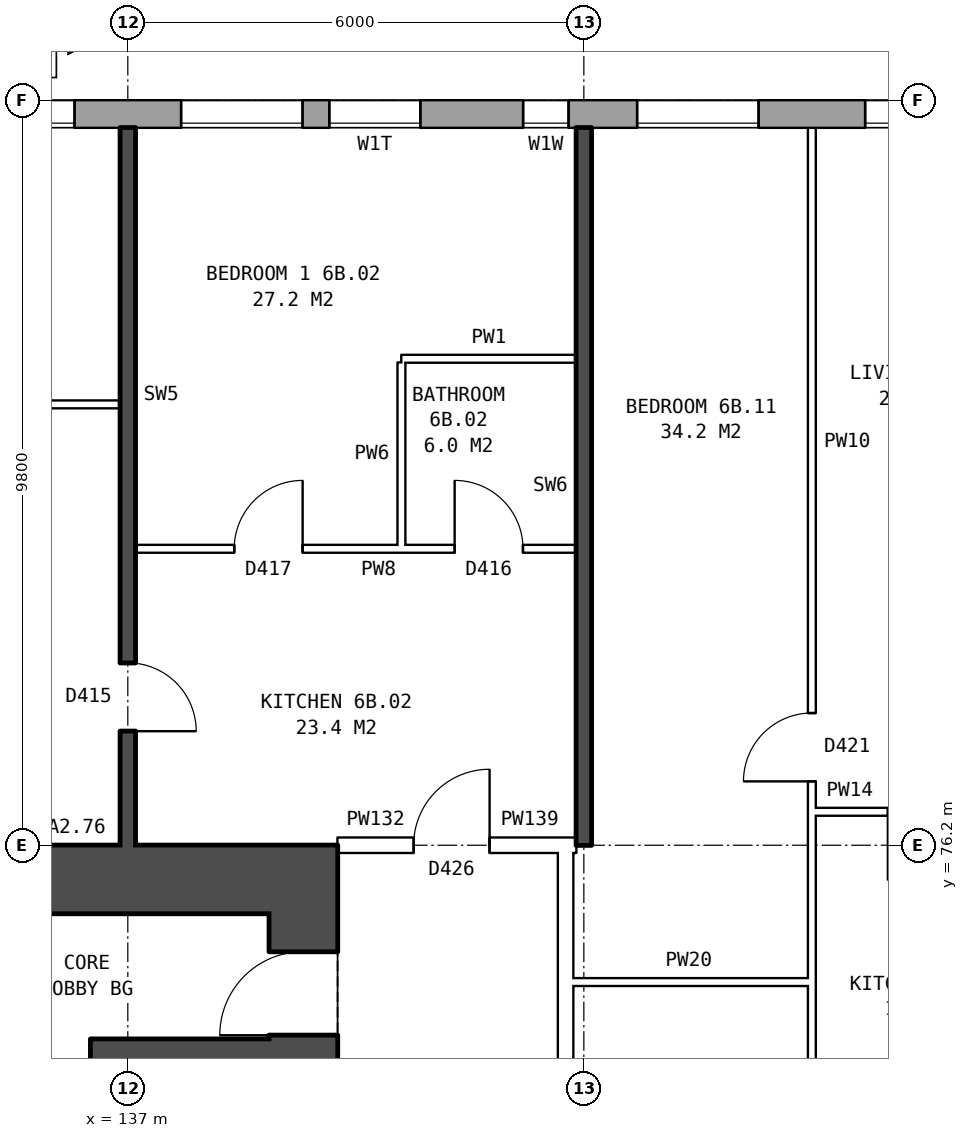
"""IFC4 building model, lengths in metres.
Left out: names, types, materials, properties, quantities, classifications, styles, units other than length and angle.
Written with IfcOpenShell. Run it as: python <this file> out.ifc"""

import sys

from ifc_helpers import new_model, si_unit, direction, frame, frame_2d, origin, place, context, subcontext, project, spatial, rectangle, extrude, element, fill, save


model = new_model("IFC4")
c1 = context("Model", 3, precision=1e-05, world=origin(), true_north=direction((0.0, 1.0)))
c2 = subcontext(c1, "Body", "Model", "MODEL_VIEW")
j1 = project(units=[si_unit("LENGTHUNIT", "METRE"), si_unit("PLANEANGLEUNIT", "RADIAN")], contexts=[c1])
p1 = place(None, origin())
s1 = spatial("IfcSite", under=j1, at=p1, CompositionType="ELEMENT")
p2 = place(p1, origin())
s2 = spatial("IfcBuilding", under=s1, at=p2, CompositionType="ELEMENT")
p3 = place(p2, frame((0.0, 0.0, 25.7)))
s3 = spatial("IfcBuildingStorey", under=s2, at=p3, CompositionType="ELEMENT", Elevation=25.7)
p4 = place(p3, frame((174.675, 85.82, 0.0), z_axis=(0.0, 0.0, 1.0), x_axis=(-1.0, 0.0, 0.0)))
e1 = element("IfcWall", 1, at=p4, inside=s3, PredefinedType="STANDARD", context=c2, shape_type="SweptSolid", body=[
    extrude(rectangle(XDim=40.601, YDim=0.36, at=frame_2d((20.3, 0.0))), origin(), (0.0, 0.0, 1.0), 2.85),
])
p5 = place(p4, frame((2.375, 0.0, 0.8)))
e2 = element("IfcOpeningElement", 2, at=p5, cuts=e1, PredefinedType="OPENING", context=c2, shape_type="SweptSolid", body=[
    extrude(rectangle(XDim=1.6, YDim=1.8, at=frame_2d((0.8, 0.9))), frame((0.0, 0.19, 0.0), z_axis=(0.0, -1.0, 0.0), x_axis=(1.0, 0.0, 0.0)), (0.0, 0.0, 1.0), 0.38),
])
p6 = place(p4, frame((4.275, 0.0, 0.8)))
e3 = element("IfcOpeningElement", 3, at=p6, cuts=e1, PredefinedType="OPENING", context=c2, shape_type="SweptSolid", body=[
    extrude(rectangle(XDim=1.2, YDim=1.8, at=frame_2d((0.6, 0.9))), frame((0.0, 0.19, 0.0), z_axis=(0.0, -1.0, 0.0), x_axis=(1.0, 0.0, 0.0)), (0.0, 0.0, 1.0), 0.38),
])
p7 = place(p4, frame((8.025, 0.0, 0.8)))
e4 = element("IfcOpeningElement", 4, at=p7, cuts=e1, PredefinedType="OPENING", context=c2, shape_type="SweptSolid", body=[
    extrude(rectangle(XDim=0.8, YDim=0.9, at=frame_2d((0.4, 0.45))), frame((0.0, 0.19, 0.0), z_axis=(0.0, -1.0, 0.0), x_axis=(1.0, 0.0, 0.0)), (0.0, 0.0, 1.0), 0.38),
])
p8 = place(p4, frame((11.375, 0.0, 0.8)))
e5 = element("IfcOpeningElement", 5, at=p8, cuts=e1, PredefinedType="OPENING", context=c2, shape_type="SweptSolid", body=[
    extrude(rectangle(XDim=1.6, YDim=1.8, at=frame_2d((0.8, 0.9))), frame((0.0, 0.19, 0.0), z_axis=(0.0, -1.0, 0.0), x_axis=(1.0, 0.0, 0.0)), (0.0, 0.0, 1.0), 0.38),
])
p9 = place(p4, frame((14.375, 0.0, 0.8)))
e6 = element("IfcOpeningElement", 6, at=p9, cuts=e1, PredefinedType="OPENING", context=c2, shape_type="SweptSolid", body=[
    extrude(rectangle(XDim=1.6, YDim=1.8, at=frame_2d((0.8, 0.9))), frame((0.0, 0.19, 0.0), z_axis=(0.0, -1.0, 0.0), x_axis=(1.0, 0.0, 0.0)), (0.0, 0.0, 1.0), 0.38),
])
p10 = place(p4, frame((17.375, 0.0, 0.8)))
e7 = element("IfcOpeningElement", 7, at=p10, cuts=e1, PredefinedType="OPENING", context=c2, shape_type="SweptSolid", body=[
    extrude(rectangle(XDim=1.6, YDim=1.8, at=frame_2d((0.8, 0.9))), frame((0.0, 0.19, 0.0), z_axis=(0.0, -1.0, 0.0), x_axis=(1.0, 0.0, 0.0)), (0.0, 0.0, 1.0), 0.38),
])
p11 = place(p4, frame((20.375, 0.0, 0.8)))
e8 = element("IfcOpeningElement", 8, at=p11, cuts=e1, PredefinedType="OPENING", context=c2, shape_type="SweptSolid", body=[
    extrude(rectangle(XDim=1.6, YDim=1.8, at=frame_2d((0.8, 0.9))), frame((0.0, 0.19, 0.0), z_axis=(0.0, -1.0, 0.0), x_axis=(1.0, 0.0, 0.0)), (0.0, 0.0, 1.0), 0.38),
])
p12 = place(p4, frame((23.375, 0.0, 0.8)))
e9 = element("IfcOpeningElement", 9, at=p12, cuts=e1, PredefinedType="OPENING", context=c2, shape_type="SweptSolid", body=[
    extrude(rectangle(XDim=1.6, YDim=1.8, at=frame_2d((0.8, 0.9))), frame((0.0, 0.19, 0.0), z_axis=(0.0, -1.0, 0.0), x_axis=(1.0, 0.0, 0.0)), (0.0, 0.0, 1.0), 0.38),
])
p13 = place(p4, frame((26.375, 0.0, 0.8)))
e10 = element("IfcOpeningElement", 10, at=p13, cuts=e1, PredefinedType="OPENING", context=c2, shape_type="SweptSolid", body=[
    extrude(rectangle(XDim=1.6, YDim=1.8, at=frame_2d((0.8, 0.9))), frame((0.0, 0.19, 0.0), z_axis=(0.0, -1.0, 0.0), x_axis=(1.0, 0.0, 0.0)), (0.0, 0.0, 1.0), 0.38),
])
p14 = place(p4, frame((29.375, 0.0, 0.8)))
e11 = element("IfcOpeningElement", 11, at=p14, cuts=e1, PredefinedType="OPENING", context=c2, shape_type="SweptSolid", body=[
    extrude(rectangle(XDim=1.6, YDim=1.8, at=frame_2d((0.8, 0.9))), frame((0.0, 0.19, 0.0), z_axis=(0.0, -1.0, 0.0), x_axis=(1.0, 0.0, 0.0)), (0.0, 0.0, 1.0), 0.38),
])
p15 = place(p4, frame((31.875, 0.0, 0.8)))
e12 = element("IfcOpeningElement", 12, at=p15, cuts=e1, PredefinedType="OPENING", context=c2, shape_type="SweptSolid", body=[
    extrude(rectangle(XDim=0.6, YDim=0.9, at=frame_2d((0.3, 0.45))), frame((0.0, 0.19, 0.0), z_axis=(0.0, -1.0, 0.0), x_axis=(1.0, 0.0, 0.0)), (0.0, 0.0, 1.0), 0.38),
])
p16 = place(p4, frame((35.375, 0.0, 0.8)))
e13 = element("IfcOpeningElement", 13, at=p16, cuts=e1, PredefinedType="OPENING", context=c2, shape_type="SweptSolid", body=[
    extrude(rectangle(XDim=1.6, YDim=1.8, at=frame_2d((0.8, 0.9))), frame((0.0, 0.19, 0.0), z_axis=(0.0, -1.0, 0.0), x_axis=(1.0, 0.0, 0.0)), (0.0, 0.0, 1.0), 0.38),
])
p17 = place(p4, frame((38.375, 0.0, 0.8)))
e14 = element("IfcOpeningElement", 14, at=p17, cuts=e1, PredefinedType="OPENING", context=c2, shape_type="SweptSolid", body=[
    extrude(rectangle(XDim=1.6, YDim=1.8, at=frame_2d((0.8, 0.9))), frame((0.0, 0.19, 0.0), z_axis=(0.0, -1.0, 0.0), x_axis=(1.0, 0.0, 0.0)), (0.0, 0.0, 1.0), 0.38),
])
p18 = place(p4, frame((5.775, 0.0, 1.7)))
e15 = element("IfcOpeningElement", 15, at=p18, cuts=e1, PredefinedType="OPENING", context=c2, shape_type="SweptSolid", body=[
    extrude(rectangle(XDim=1.0, YDim=0.9, at=frame_2d((0.5, 0.45))), frame((0.0, 0.19, 0.0), z_axis=(0.0, -1.0, 0.0), x_axis=(1.0, 0.0, 0.0)), (0.0, 0.0, 1.0), 0.38),
])
p19 = place(p4, frame((9.125, 0.0, 0.8)))
e16 = element("IfcOpeningElement", 16, at=p19, cuts=e1, PredefinedType="OPENING", context=c2, shape_type="SweptSolid", body=[
    extrude(rectangle(XDim=1.2, YDim=1.8, at=frame_2d((0.6, 0.9))), frame((0.0, 0.19, 0.0), z_axis=(0.0, -1.0, 0.0), x_axis=(1.0, 0.0, 0.0)), (0.0, 0.0, 1.0), 0.38),
])
p20 = place(p4, frame((33.825, 0.0, 1.7)))
e17 = element("IfcOpeningElement", 17, at=p20, cuts=e1, PredefinedType="OPENING", context=c2, shape_type="SweptSolid", body=[
    extrude(rectangle(XDim=1.2, YDim=0.9, at=frame_2d((0.6, 0.45))), frame((0.0, 0.19, 0.0), z_axis=(0.0, -1.0, 0.0), x_axis=(1.0, 0.0, 0.0)), (0.0, 0.0, 1.0), 0.38),
])
p21 = place(p3, frame((139.31, 64.7, 0.0), z_axis=(0.0, 0.0, 1.0), x_axis=(0.0, 1.0, 0.0)))
e18 = element("IfcWall", 18, at=p21, inside=s3, PredefinedType="SHEAR", context=c2, shape_type="SweptSolid", body=[
    extrude(rectangle(XDim=10.6, YDim=0.9, at=frame_2d((5.3, 0.0))), origin(), (0.0, 0.0, 1.0), 2.85),
])
p22 = place(p21, frame((0.425, 0.0, 0.0)))
e19 = element("IfcOpeningElement", 19, at=p22, cuts=e18, PredefinedType="OPENING", context=c2, shape_type="SweptSolid", body=[
    extrude(rectangle(XDim=1.1, YDim=2.1, at=frame_2d((0.55, 1.05))), frame((0.0, 0.46, 0.0), z_axis=(0.0, -1.0, 0.0), x_axis=(1.0, 0.0, 0.0)), (0.0, 0.0, 1.0), 0.92),
])
p23 = place(p21, frame((9.0, 0.0, 0.0)))
e20 = element("IfcOpeningElement", 20, at=p23, cuts=e18, PredefinedType="OPENING", context=c2, shape_type="SweptSolid", body=[
    extrude(rectangle(XDim=1.1, YDim=2.1, at=frame_2d((0.55, 1.05))), frame((0.0, 0.46, 0.0), z_axis=(0.0, -1.0, 0.0), x_axis=(1.0, 0.0, 0.0)), (0.0, 0.0, 1.0), 0.92),
])
p24 = place(p21, frame((7.225, 0.0, 0.0)))
e21 = element("IfcOpeningElement", 21, at=p24, cuts=e18, PredefinedType="OPENING", context=c2, shape_type="SweptSolid", body=[
    extrude(rectangle(XDim=0.85, YDim=2.1, at=frame_2d((0.425, 1.05))), frame((0.0, 0.46, 0.0), z_axis=(0.0, -1.0, 0.0), x_axis=(1.0, 0.0, 0.0)), (0.0, 0.0, 1.0), 0.92),
])
p25 = place(p3, frame((139.76, 75.75, 0.0), z_axis=(0.0, 0.0, 1.0), x_axis=(-1.0, 0.0, 0.0)))
e22 = element("IfcWall", 22, at=p25, inside=s3, PredefinedType="SHEAR", context=c2, shape_type="SweptSolid", body=[
    extrude(rectangle(XDim=8.4, YDim=0.9, at=frame_2d((4.2, 0.0))), origin(), (0.0, 0.0, 1.0), 2.85),
])
p26 = place(p3, frame((138.86, 73.45, 0.0), z_axis=(0.0, 0.0, 1.0), x_axis=(-1.0, 0.0, 0.0)))
e23 = element("IfcWall", 23, at=p26, inside=s3, PredefinedType="SHEAR", context=c2, shape_type="SweptSolid", body=[
    extrude(rectangle(XDim=1.95, YDim=0.4, at=frame_2d((0.975, 0.0))), origin(), (0.0, 0.0, 1.0), 2.85),
])
p27 = place(p3, frame((136.71, 71.45, 0.0), z_axis=(0.0, 0.0, 1.0), x_axis=(0.0, 1.0, 0.0)))
e24 = element("IfcWall", 24, at=p27, inside=s3, PredefinedType="SHEAR", context=c2, shape_type="SweptSolid", body=[
    extrude(rectangle(XDim=2.2, YDim=0.4, at=frame_2d((1.1, 0.0))), origin(), (0.0, 0.0, 1.0), 2.85),
])
p28 = place(p3, frame((142.76, 63.9, 0.0), z_axis=(0.0, 0.0, 1.0), x_axis=(0.0, 1.0, 0.0)))
e25 = element("IfcWall", 25, at=p28, inside=s3, PredefinedType="PARTITIONING", context=c2, shape_type="SweptSolid", body=[
    extrude(rectangle(XDim=12.2, YDim=0.2, at=frame_2d((6.1, 0.0))), origin(), (0.0, 0.0, 1.0), 2.85),
])
p29 = place(p28, frame((5.1, 0.0, 0.0)))
e26 = element("IfcOpeningElement", 26, at=p29, cuts=e25, PredefinedType="OPENING", context=c2, shape_type="SweptSolid", body=[
    extrude(rectangle(XDim=2.0, YDim=2.1, at=frame_2d((1.0, 1.05))), frame((0.0, 0.11, 0.0), z_axis=(0.0, -1.0, 0.0), x_axis=(1.0, 0.0, 0.0)), (0.0, 0.0, 1.0), 0.22),
])
p30 = place(p3, frame((142.76, 74.4, 0.0), z_axis=(0.0, 0.0, 1.0), x_axis=(1.0, 0.0, 0.0)))
e27 = element("IfcWall", 27, at=p30, inside=s3, PredefinedType="PARTITIONING", context=c2, shape_type="SweptSolid", body=[
    extrude(rectangle(XDim=3.24, YDim=0.1, at=frame_2d((1.62, 0.0))), origin(), (0.0, 0.0, 1.0), 2.85),
])
p31 = place(p3, frame((139.76, 76.2, 0.0), z_axis=(0.0, 0.0, 1.0), x_axis=(1.0, 0.0, 0.0)))
e28 = element("IfcWall", 28, at=p31, inside=s3, PredefinedType="PARTITIONING", context=c2, shape_type="SweptSolid", body=[
    extrude(rectangle(XDim=3.0, YDim=0.2, at=frame_2d((1.5, 0.0))), origin(), (0.0, 0.0, 1.0), 2.85),
])
p32 = place(p31, frame((1.0, 0.0, 0.0)))
e29 = element("IfcOpeningElement", 29, at=p32, cuts=e28, PredefinedType="OPENING", context=c2, shape_type="SweptSolid", body=[
    extrude(rectangle(XDim=1.0, YDim=2.1, at=frame_2d((0.5, 1.05))), frame((0.0, 0.11, 0.0), z_axis=(0.0, -1.0, 0.0), x_axis=(1.0, 0.0, 0.0)), (0.0, 0.0, 1.0), 0.22),
])
p33 = place(p3, frame((142.76, 76.2, 0.0), z_axis=(0.0, 0.0, 1.0), x_axis=(1.0, 0.0, 0.0)))
e30 = element("IfcWall", 30, at=p33, inside=s3, PredefinedType="PARTITIONING", context=c2, shape_type="SweptSolid", body=[
    extrude(rectangle(XDim=0.14, YDim=0.2, at=frame_2d((0.07, 0.0))), origin(), (0.0, 0.0, 1.0), 2.85),
])
p34 = place(p3, frame((146.0, 76.64, 0.0), z_axis=(0.0, 0.0, 1.0), x_axis=(1.0, 0.0, 0.0)))
e31 = element("IfcWall", 31, at=p34, inside=s3, PredefinedType="PARTITIONING", context=c2, shape_type="SweptSolid", body=[
    extrude(rectangle(XDim=2.9, YDim=0.1, at=frame_2d((1.45, 0.0))), origin(), (0.0, 0.0, 1.0), 2.85),
])
p35 = place(p34, frame((1.0, 0.0, 0.0)))
e32 = element("IfcOpeningElement", 32, at=p35, cuts=e31, PredefinedType="OPENING", context=c2, shape_type="SweptSolid", body=[
    extrude(rectangle(XDim=0.9, YDim=2.1, at=frame_2d((0.45, 1.05))), frame((0.0, 0.06, 0.0), z_axis=(0.0, -1.0, 0.0), x_axis=(1.0, 0.0, 0.0)), (0.0, 0.0, 1.0), 0.12),
])
p36 = place(p3, frame((137.1, 80.1, 0.0), z_axis=(0.0, 0.0, 1.0), x_axis=(1.0, 0.0, 0.0)))
e33 = element("IfcWall", 33, at=p36, inside=s3, PredefinedType="PARTITIONING", context=c2, shape_type="SweptSolid", body=[
    extrude(rectangle(XDim=5.8, YDim=0.1, at=frame_2d((2.9, 0.0))), origin(), (0.0, 0.0, 1.0), 2.85),
])
p37 = place(p36, frame((1.3, 0.0, 0.0)))
e34 = element("IfcOpeningElement", 34, at=p37, cuts=e33, PredefinedType="OPENING", context=c2, shape_type="SweptSolid", body=[
    extrude(rectangle(XDim=0.9, YDim=2.1, at=frame_2d((0.45, 1.05))), frame((0.0, 0.06, 0.0), z_axis=(0.0, -1.0, 0.0), x_axis=(1.0, 0.0, 0.0)), (0.0, 0.0, 1.0), 0.12),
])
p38 = place(p36, frame((4.2, 0.0, 0.0)))
e35 = element("IfcOpeningElement", 35, at=p38, cuts=e33, PredefinedType="OPENING", context=c2, shape_type="SweptSolid", body=[
    extrude(rectangle(XDim=0.9, YDim=2.1, at=frame_2d((0.45, 1.05))), frame((0.0, 0.06, 0.0), z_axis=(0.0, -1.0, 0.0), x_axis=(1.0, 0.0, 0.0)), (0.0, 0.0, 1.0), 0.12),
])
p39 = place(p3, frame((131.36, 82.0, 0.0), z_axis=(0.0, 0.0, 1.0), x_axis=(1.0, 0.0, 0.0)))
e36 = element("IfcWall", 36, at=p39, inside=s3, PredefinedType="PARTITIONING", context=c2, shape_type="SweptSolid", body=[
    extrude(rectangle(XDim=5.54, YDim=0.1, at=frame_2d((2.77, 0.0))), origin(), (0.0, 0.0, 1.0), 2.85),
])
p40 = place(p39, frame((2.32, 0.0, 0.0)))
e37 = element("IfcOpeningElement", 37, at=p40, cuts=e36, PredefinedType="OPENING", context=c2, shape_type="SweptSolid", body=[
    extrude(rectangle(XDim=0.9, YDim=2.1, at=frame_2d((0.45, 1.05))), frame((0.0, 0.06, 0.0), z_axis=(0.0, -1.0, 0.0), x_axis=(1.0, 0.0, 0.0)), (0.0, 0.0, 1.0), 0.12),
])
p41 = place(p3, frame((140.6, 82.6, 0.0), z_axis=(0.0, 0.0, 1.0), x_axis=(1.0, 0.0, 0.0)))
e38 = element("IfcWall", 38, at=p41, inside=s3, PredefinedType="PARTITIONING", context=c2, shape_type="SweptSolid", body=[
    extrude(rectangle(XDim=2.3, YDim=0.1, at=frame_2d((1.15, 0.0))), origin(), (0.0, 0.0, 1.0), 2.85),
])
p42 = place(p3, frame((137.0, 76.2, 0.0), z_axis=(0.0, 0.0, 1.0), x_axis=(0.0, 1.0, 0.0)))
e39 = element("IfcWall", 39, at=p42, inside=s3, PredefinedType="SOLIDWALL", context=c2, shape_type="SweptSolid", body=[
    extrude(rectangle(XDim=9.44, YDim=0.2, at=frame_2d((4.72, 0.0))), origin(), (0.0, 0.0, 1.0), 2.85),
])
p43 = place(p42, frame((1.5, 0.0, 0.0)))
e40 = element("IfcOpeningElement", 40, at=p43, cuts=e39, PredefinedType="OPENING", context=c2, shape_type="SweptSolid", body=[
    extrude(rectangle(XDim=0.9, YDim=2.1, at=frame_2d((0.45, 1.05))), frame((0.0, 0.11, 0.0), z_axis=(0.0, -1.0, 0.0), x_axis=(1.0, 0.0, 0.0)), (0.0, 0.0, 1.0), 0.22),
])
p44 = place(p3, frame((140.6, 80.15, 0.0), z_axis=(0.0, 0.0, 1.0), x_axis=(0.0, 1.0, 0.0)))
e41 = element("IfcWall", 41, at=p44, inside=s3, PredefinedType="PARTITIONING", context=c2, shape_type="SweptSolid", body=[
    extrude(rectangle(XDim=2.4, YDim=0.1, at=frame_2d((1.2, 0.0))), origin(), (0.0, 0.0, 1.0), 2.85),
])
p45 = place(p3, frame((143.0, 76.2, 0.0), z_axis=(0.0, 0.0, 1.0), x_axis=(0.0, 1.0, 0.0)))
e42 = element("IfcWall", 42, at=p45, inside=s3, PredefinedType="SOLIDWALL", context=c2, shape_type="SweptSolid", body=[
    extrude(rectangle(XDim=9.44, YDim=0.2, at=frame_2d((4.72, 0.0))), origin(), (0.0, 0.0, 1.0), 2.85),
])
p46 = place(p3, frame((146.0, 71.3, 0.0), z_axis=(0.0, 0.0, 1.0), x_axis=(0.0, 1.0, 0.0)))
e43 = element("IfcWall", 43, at=p46, inside=s3, PredefinedType="PARTITIONING", context=c2, shape_type="SweptSolid", body=[
    extrude(rectangle(XDim=14.34, YDim=0.1, at=frame_2d((7.17, 0.0))), origin(), (0.0, 0.0, 1.0), 2.85),
])
p47 = place(p46, frame((5.74, 0.0, 0.0)))
e44 = element("IfcOpeningElement", 44, at=p47, cuts=e43, PredefinedType="OPENING", context=c2, shape_type="SweptSolid", body=[
    extrude(rectangle(XDim=0.9, YDim=2.1, at=frame_2d((0.45, 1.05))), frame((0.0, 0.06, 0.0), z_axis=(0.0, -1.0, 0.0), x_axis=(1.0, 0.0, 0.0)), (0.0, 0.0, 1.0), 0.12),
])
p48 = place(p46, frame((0.4, 0.0, 0.0)))
e45 = element("IfcOpeningElement", 45, at=p48, cuts=e43, PredefinedType="OPENING", context=c2, shape_type="SweptSolid", body=[
    extrude(rectangle(XDim=0.9, YDim=2.1, at=frame_2d((0.45, 1.05))), frame((0.0, 0.06, 0.0), z_axis=(0.0, -1.0, 0.0), x_axis=(1.0, 0.0, 0.0)), (0.0, 0.0, 1.0), 0.12),
])
p49 = place(p13, origin())
e46 = element("IfcWindow", 46, at=p49, inside=s3, PartitioningType="SINGLE_PANEL", PredefinedType="WINDOW", context=c2, shape_type="SweptSolid", body=[
    extrude(rectangle(XDim=1.6, YDim=1.8, at=frame_2d((0.8, 0.9))), frame((0.0, 0.15, 0.0), z_axis=(0.0, -1.0, 0.0), x_axis=(1.0, 0.0, 0.0)), (0.0, 0.0, 1.0), 0.06),
])
fill(e10, e46)
p50 = place(p14, origin())
e47 = element("IfcWindow", 47, at=p50, inside=s3, PartitioningType="SINGLE_PANEL", PredefinedType="WINDOW", context=c2, shape_type="SweptSolid", body=[
    extrude(rectangle(XDim=1.6, YDim=1.8, at=frame_2d((0.8, 0.9))), frame((0.0, 0.15, 0.0), z_axis=(0.0, -1.0, 0.0), x_axis=(1.0, 0.0, 0.0)), (0.0, 0.0, 1.0), 0.06),
])
fill(e11, e47)
p51 = place(p15, origin())
e48 = element("IfcWindow", 48, at=p51, inside=s3, PartitioningType="SINGLE_PANEL", PredefinedType="WINDOW", context=c2, shape_type="SweptSolid", body=[
    extrude(rectangle(XDim=0.6, YDim=0.9, at=frame_2d((0.3, 0.45))), frame((0.0, 0.15, 0.0), z_axis=(0.0, -1.0, 0.0), x_axis=(1.0, 0.0, 0.0)), (0.0, 0.0, 1.0), 0.06),
])
fill(e12, e48)
p52 = place(p16, origin())
e49 = element("IfcWindow", 49, at=p52, inside=s3, PartitioningType="SINGLE_PANEL", PredefinedType="WINDOW", context=c2, shape_type="SweptSolid", body=[
    extrude(rectangle(XDim=1.6, YDim=1.8, at=frame_2d((0.8, 0.9))), frame((0.0, 0.15, 0.0), z_axis=(0.0, -1.0, 0.0), x_axis=(1.0, 0.0, 0.0)), (0.0, 0.0, 1.0), 0.06),
])
fill(e13, e49)
p53 = place(p17, origin())
e50 = element("IfcWindow", 50, at=p53, inside=s3, PartitioningType="SINGLE_PANEL", PredefinedType="WINDOW", context=c2, shape_type="SweptSolid", body=[
    extrude(rectangle(XDim=1.6, YDim=1.8, at=frame_2d((0.8, 0.9))), frame((0.0, 0.15, 0.0), z_axis=(0.0, -1.0, 0.0), x_axis=(1.0, 0.0, 0.0)), (0.0, 0.0, 1.0), 0.06),
])
fill(e14, e50)
p54 = place(p23, origin())
e51 = element("IfcDoor", 51, at=p54, inside=s3, OperationType="SINGLE_SWING_LEFT", PredefinedType="DOOR", context=c2, shape_type="SweptSolid", body=[
    extrude(rectangle(XDim=1.1, YDim=2.1, at=frame_2d((0.55, 1.05))), frame((0.0, 0.435, 0.0), z_axis=(0.0, -1.0, 0.0), x_axis=(1.0, 0.0, 0.0)), (0.0, 0.0, 1.0), 0.05),
])
fill(e20, e51)
p55 = place(p37, origin())
e52 = element("IfcDoor", 52, at=p55, inside=s3, OperationType="SINGLE_SWING_RIGHT", PredefinedType="DOOR", context=c2, shape_type="SweptSolid", body=[
    extrude(rectangle(XDim=0.9, YDim=2.1, at=frame_2d((0.45, 1.05))), frame((0.0, 0.025, 0.0), z_axis=(0.0, -1.0, 0.0), x_axis=(1.0, 0.0, 0.0)), (0.0, 0.0, 1.0), 0.05),
])
fill(e34, e52)
p56 = place(p32, origin())
e53 = element("IfcDoor", 53, at=p56, inside=s3, OperationType="SINGLE_SWING_RIGHT", PredefinedType="DOOR", context=c2, shape_type="SweptSolid", body=[
    extrude(rectangle(XDim=1.0, YDim=2.1, at=frame_2d((0.5, 1.05))), frame((0.0, 0.025, 0.0), z_axis=(0.0, -1.0, 0.0), x_axis=(1.0, 0.0, 0.0)), (0.0, 0.0, 1.0), 0.05),
])
fill(e29, e53)
p57 = place(p43, frame((0.9, 0.0, 0.0), z_axis=(0.0, 0.0, 1.0), x_axis=(-1.0, 0.0, 0.0)))
e54 = element("IfcDoor", 54, at=p57, inside=s3, OperationType="SINGLE_SWING_RIGHT", PredefinedType="DOOR", context=c2, shape_type="SweptSolid", body=[
    extrude(rectangle(XDim=0.9, YDim=2.1, at=frame_2d((0.45, 1.05))), frame((0.0, 0.025, 0.0), z_axis=(0.0, -1.0, 0.0), x_axis=(1.0, 0.0, 0.0)), (0.0, 0.0, 1.0), 0.05),
])
fill(e40, e54)
p58 = place(p38, origin())
e55 = element("IfcDoor", 55, at=p58, inside=s3, OperationType="SINGLE_SWING_LEFT", PredefinedType="DOOR", context=c2, shape_type="SweptSolid", body=[
    extrude(rectangle(XDim=0.9, YDim=2.1, at=frame_2d((0.45, 1.05))), frame((0.0, 0.025, 0.0), z_axis=(0.0, -1.0, 0.0), x_axis=(1.0, 0.0, 0.0)), (0.0, 0.0, 1.0), 0.05),
])
fill(e35, e55)
p59 = place(p47, origin())
e56 = element("IfcDoor", 56, at=p59, inside=s3, OperationType="SINGLE_SWING_LEFT", PredefinedType="DOOR", context=c2, shape_type="SweptSolid", body=[
    extrude(rectangle(XDim=0.9, YDim=2.1, at=frame_2d((0.45, 1.05))), frame((0.0, 0.025, 0.0), z_axis=(0.0, -1.0, 0.0), x_axis=(1.0, 0.0, 0.0)), (0.0, 0.0, 1.0), 0.05),
])
fill(e44, e56)
p60 = place(p20, origin())
e57 = element("IfcWindow", 57, at=p60, inside=s3, PartitioningType="SINGLE_PANEL", PredefinedType="WINDOW", context=c2, shape_type="SweptSolid", body=[
    extrude(rectangle(XDim=1.2, YDim=0.9, at=frame_2d((0.6, 0.45))), frame((0.0, 0.15, 0.0), z_axis=(0.0, -1.0, 0.0), x_axis=(1.0, 0.0, 0.0)), (0.0, 0.0, 1.0), 0.06),
])
fill(e17, e57)
save(model, sys.argv[1])
